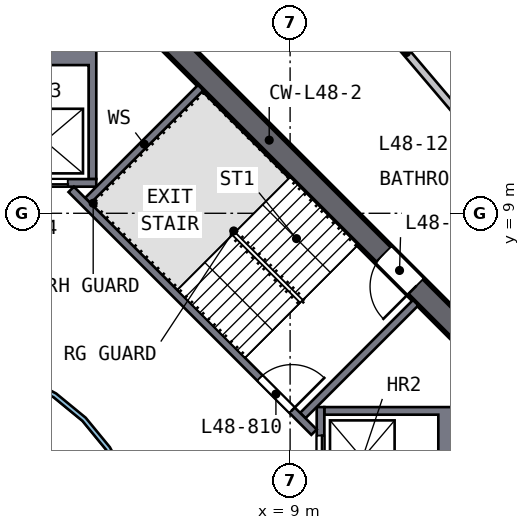
"""IFC4 building model, lengths in metres.
Left out: names, types, materials, properties, quantities, classifications, styles, units other than length and angle.
Written with IfcOpenShell. Run it as: python <this file> out.ifc"""

import sys

from ifc_helpers import new_model, si_unit, direction, frame, frame_2d, origin, place, context, subcontext, project, spatial, polyline, rectangle, outline, extrude, element, fill, save


model = new_model("IFC4")
c1 = context("Model", 3, precision=1e-05, world=origin(), true_north=direction((0.0, 1.0)))
c2 = subcontext(c1, "Body", "Model", "MODEL_VIEW")
j1 = project(units=[si_unit("LENGTHUNIT", "METRE"), si_unit("PLANEANGLEUNIT", "RADIAN")], contexts=[c1])
p1 = place(None, origin())
s1 = spatial("IfcSite", under=j1, at=p1, CompositionType="ELEMENT")
p2 = place(p1, origin())
s2 = spatial("IfcBuilding", under=s1, at=p2, CompositionType="ELEMENT")
p3 = place(p2, frame((0.0, 0.0, 197.5)))
s3 = spatial("IfcBuildingStorey", under=s2, at=p3, CompositionType="ELEMENT", Elevation=197.5)
p4 = place(p3, frame((13.788, 5.587, 0.0), z_axis=(0.0, 0.0, 1.0), x_axis=(-0.707106781, 0.707106781, 0.0)))
e1 = element("IfcWall", 1, at=p4, inside=s3, PredefinedType="SHEAR", context=c2, shape_type="SweptSolid", body=[
    extrude(rectangle(XDim=11.598, YDim=0.6, at=frame_2d((5.799, 0.0))), origin(), (0.0, 0.0, 1.0), 3.5),
])
p5 = place(p4, frame((2.099, 0.0, 0.0)))
e2 = element("IfcOpeningElement", 2, at=p5, cuts=e1, PredefinedType="OPENING", context=c2, shape_type="SweptSolid", body=[
    extrude(rectangle(XDim=1.2, YDim=2.1, at=frame_2d((0.6, 1.05))), frame((0.0, 0.31, 0.0), z_axis=(0.0, -1.0, 0.0), x_axis=(1.0, 0.0, 0.0)), (0.0, 0.0, 1.0), 0.62),
])
p6 = place(p3, origin())
e3 = element("IfcWall", 3, at=p6, inside=s3, PredefinedType="SOLIDWALL", context=c2, shape_type="SweptSolid", body=[
    extrude(outline(polyline([(13.4, 3.9), (13.4, 1.2), (9.9, 1.2), (9.9, 1.4), (12.9, 1.4), (12.9, 3.7), (9.9, 3.7), (9.9, 3.9), (13.4, 3.9)])), origin(), (0.0, 0.0, 1.0), 3.19),
])
p7 = place(p3, frame((9.8, 1.2, 0.0), z_axis=(0.0, 0.0, 1.0), x_axis=(0.0, 1.0, 0.0)))
e4 = element("IfcWall", 4, at=p7, inside=s3, PredefinedType="SOLIDWALL", context=c2, shape_type="SweptSolid", body=[
    extrude(rectangle(XDim=2.7, YDim=0.2, at=frame_2d((1.35, 0.0))), origin(), (0.0, 0.0, 1.0), 3.19),
])
p8 = place(p7, frame((0.75, 0.0, 0.0)))
e5 = element("IfcOpeningElement", 5, at=p8, cuts=e4, PredefinedType="OPENING", context=c2, shape_type="SweptSolid", body=[
    extrude(rectangle(XDim=1.2, YDim=2.1, at=frame_2d((0.6, 1.05))), frame((0.0, 0.11, 0.0), z_axis=(0.0, -1.0, 0.0), x_axis=(1.0, 0.0, 0.0)), (0.0, 0.0, 1.0), 0.22),
])
p9 = place(p3, origin())
e6 = element("IfcWall", 6, at=p9, inside=s3, PredefinedType="SOLIDWALL", context=c2, shape_type="SweptSolid", body=[
    extrude(outline(polyline([(3.9, 9.9), (3.7, 9.9), (3.7, 12.9), (1.4, 12.9), (1.4, 9.9), (1.2, 9.9), (1.2, 13.4), (3.9, 13.4), (3.9, 9.9)])), origin(), (0.0, 0.0, 1.0), 3.19),
])
p10 = place(p3, frame((1.2, 9.8, 0.0), z_axis=(0.0, 0.0, 1.0), x_axis=(1.0, 0.0, 0.0)))
e7 = element("IfcWall", 7, at=p10, inside=s3, PredefinedType="SOLIDWALL", context=c2, shape_type="SweptSolid", body=[
    extrude(rectangle(XDim=2.7, YDim=0.2, at=frame_2d((1.35, 0.0))), origin(), (0.0, 0.0, 1.0), 3.19),
])
p11 = place(p10, frame((0.75, 0.0, 0.0)))
e8 = element("IfcOpeningElement", 8, at=p11, cuts=e7, PredefinedType="OPENING", context=c2, shape_type="SweptSolid", body=[
    extrude(rectangle(XDim=1.2, YDim=2.1, at=frame_2d((0.6, 1.05))), frame((0.0, 0.11, 0.0), z_axis=(0.0, -1.0, 0.0), x_axis=(1.0, 0.0, 0.0)), (0.0, 0.0, 1.0), 0.22),
])
p12 = place(p3, frame((3.24, 9.629, 0.0), z_axis=(0.0, 0.0, 1.0), x_axis=(0.707106781, -0.707106781, 0.0)))
e9 = element("IfcWall", 9, at=p12, inside=s3, PredefinedType="SOLIDWALL", context=c2, shape_type="SweptSolid", body=[
    extrude(rectangle(XDim=9.036, YDim=0.2, at=frame_2d((4.518, 0.0))), origin(), (0.0, 0.0, 1.0), 3.19),
])
p13 = place(p12, frame((7.018, 0.0, 0.0)))
e10 = element("IfcOpeningElement", 10, at=p13, cuts=e9, PredefinedType="OPENING", context=c2, shape_type="SweptSolid", body=[
    extrude(rectangle(XDim=1.2, YDim=2.1, at=frame_2d((0.6, 1.05))), frame((0.0, 0.11, 0.0), z_axis=(0.0, -1.0, 0.0), x_axis=(1.0, 0.0, 0.0)), (0.0, 0.0, 1.0), 0.22),
])
for number, where, z_axis, x_axis in (
    (11, (9.334, 3.677, 0.0), (0.0, 0.0, 1.0), (0.707, 0.707, 0.0)),
    (12, (3.677, 9.334, 0.0), (0.0, 0.0, 1.0), (0.707, 0.707, 0.0)),
):
    element("IfcWall", number, at=place(p3, frame(where, z_axis=z_axis, x_axis=x_axis)), inside=s3, PredefinedType="SOLIDWALL", context=c2, shape_type="SweptSolid", body=[
        extrude(rectangle(XDim=4.2, YDim=0.2, at=frame_2d((2.1, 0.0))), origin(), (0.0, 0.0, 1.0), 3.19),
    ])
p14 = place(p3, origin())
e13 = element("IfcWall", 13, at=p14, inside=s3, PredefinedType="SOLIDWALL", context=c2, shape_type="SweptSolid", body=[
    extrude(outline(polyline([(5.021, -0.999), (4.73, -1.959), (4.257, -2.844), (3.62, -3.62), (2.844, -4.257), (1.959, -4.73), (0.999, -5.021), (0.0, -5.12), (-0.999, -5.021), (-1.959, -4.73), (-2.844, -4.257), (-3.62, -3.62), (-4.257, -2.844), (-4.73, -1.959), (-5.021, -0.999), (-5.12, 0.0), (-5.021, 0.999), (-4.73, 1.959), (-4.257, 2.844), (-3.62, 3.62), (-2.844, 4.257), (-1.959, 4.73), (-0.999, 5.021), (0.0, 5.12), (0.999, 5.021), (1.959, 4.73), (2.844, 4.257), (3.62, 3.62), (4.257, 2.844), (4.73, 1.959), (5.021, 0.999), (5.12, 0.0), (5.021, -0.999)]), holes=[polyline([(4.904, 0.976), (4.619, 1.913), (4.157, 2.778), (3.535, 3.535), (2.778, 4.157), (1.913, 4.619), (0.976, 4.904), (0.0, 5.0), (-0.976, 4.904), (-1.913, 4.619), (-2.778, 4.157), (-3.535, 3.535), (-4.157, 2.778), (-4.619, 1.913), (-4.904, 0.976), (-5.0, 0.0), (-4.904, -0.976), (-4.619, -1.913), (-4.157, -2.778), (-3.535, -3.535), (-2.778, -4.157), (-1.913, -4.619), (-0.976, -4.904), (0.0, -5.0), (0.976, -4.904), (1.913, -4.619), (2.778, -4.157), (3.535, -3.535), (4.157, -2.778), (4.619, -1.913), (4.904, -0.976), (5.0, 0.0), (4.904, 0.976)])]), origin(), (0.0, 0.0, 1.0), 3.19),
])
p15 = place(p3, frame((10.461, 15.118, 0.0), z_axis=(0.0, 0.0, 1.0), x_axis=(0.647056399, -0.76244214, 0.0)))
e14 = element("IfcWall", 14, at=p15, inside=s3, PredefinedType="SOLIDWALL", context=c2, shape_type="SweptSolid", body=[
    extrude(rectangle(XDim=9.316, YDim=0.2, at=frame_2d((4.658, 0.0))), origin(), (0.0, 0.0, 1.0), 3.19),
])
p16 = place(p15, frame((5.15, 0.0, 0.0)))
e15 = element("IfcOpeningElement", 15, at=p16, cuts=e14, PredefinedType="OPENING", context=c2, shape_type="SweptSolid", body=[
    extrude(rectangle(XDim=1.0, YDim=2.1, at=frame_2d((0.5, 1.05))), frame((0.0, 0.11, 0.0), z_axis=(0.0, -1.0, 0.0), x_axis=(1.0, 0.0, 0.0)), (0.0, 0.0, 1.0), 0.22),
])
p17 = place(p8, origin())
e16 = element("IfcDoor", 16, at=p17, inside=s3, OperationType="DOUBLE_DOOR_SLIDING", PredefinedType="DOOR", context=c2, shape_type="SweptSolid", body=[
    extrude(rectangle(XDim=1.2, YDim=2.1, at=frame_2d((0.6, 1.05))), frame((0.0, 0.025, 0.0), z_axis=(0.0, -1.0, 0.0), x_axis=(1.0, 0.0, 0.0)), (0.0, 0.0, 1.0), 0.05),
])
fill(e5, e16)
p18 = place(p11, origin())
e17 = element("IfcDoor", 17, at=p18, inside=s3, OperationType="DOUBLE_DOOR_SLIDING", PredefinedType="DOOR", context=c2, shape_type="SweptSolid", body=[
    extrude(rectangle(XDim=1.2, YDim=2.1, at=frame_2d((0.6, 1.05))), frame((0.0, 0.025, 0.0), z_axis=(0.0, -1.0, 0.0), x_axis=(1.0, 0.0, 0.0)), (0.0, 0.0, 1.0), 0.05),
])
fill(e8, e17)
p19 = place(p13, origin())
e18 = element("IfcDoor", 18, at=p19, inside=s3, OperationType="SINGLE_SWING_RIGHT", PredefinedType="DOOR", context=c2, shape_type="SweptSolid", body=[
    extrude(rectangle(XDim=1.2, YDim=2.1, at=frame_2d((0.6, 1.05))), frame((0.0, 0.025, 0.0), z_axis=(0.0, -1.0, 0.0), x_axis=(1.0, 0.0, 0.0)), (0.0, 0.0, 1.0), 0.05),
])
fill(e10, e18)
p20 = place(p5, origin())
e19 = element("IfcDoor", 19, at=p20, inside=s3, OperationType="SINGLE_SWING_LEFT", PredefinedType="DOOR", context=c2, shape_type="SweptSolid", body=[
    extrude(rectangle(XDim=1.2, YDim=2.1, at=frame_2d((0.6, 1.05))), frame((0.0, 0.025, 0.0), z_axis=(0.0, -1.0, 0.0), x_axis=(1.0, 0.0, 0.0)), (0.0, 0.0, 1.0), 0.05),
])
fill(e2, e19)
save(model, sys.argv[1])
